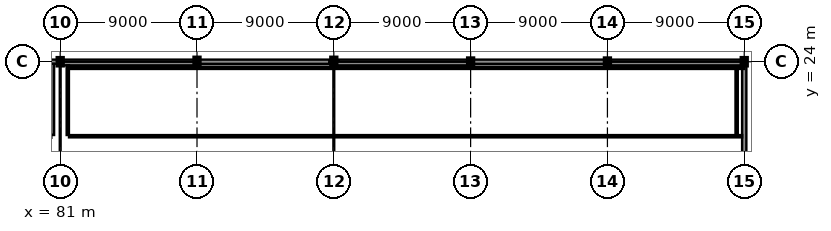
"""IFC4 building model, lengths in metres.
Left out: names, types, materials, properties, quantities, classifications, styles, units other than length and angle.
Written with IfcOpenShell. Run it as: python <this file> out.ifc"""

import sys

from ifc_helpers import new_model, si_unit, direction, frame, frame_2d, origin, origin_2d, place, context, subcontext, project, spatial, rectangle, i_section, extrude, element, fill, save


model = new_model("IFC4")
c1 = context("Model", 3, precision=1e-05, world=origin(), true_north=direction((0.0, 1.0)))
c2 = subcontext(c1, "Body", "Model", "MODEL_VIEW")
j1 = project(units=[si_unit("LENGTHUNIT", "METRE"), si_unit("PLANEANGLEUNIT", "RADIAN")], contexts=[c1])
p1 = place(None, origin())
s1 = spatial("IfcSite", under=j1, at=p1, CompositionType="ELEMENT")
p2 = place(p1, origin())
s2 = spatial("IfcBuilding", under=s1, at=p2, CompositionType="ELEMENT")
p3 = place(p2, frame((0.0, 0.0, 35.4)))
s3 = spatial("IfcBuildingStorey", under=s2, at=p3, CompositionType="ELEMENT", Elevation=35.4)
p4 = place(p3, frame((81.0, 24.0, 0.0), z_axis=(0.0, 0.0, 1.0), x_axis=(1.0, 0.0, 0.0)))
e1 = element("IfcColumn", 1, at=p4, inside=s3, PredefinedType="COLUMN", context=c2, shape_type="SweptSolid", body=[
    extrude(i_section(OverallWidth=0.3, OverallDepth=0.45, WebThickness=0.014, FlangeThickness=0.026, at=origin_2d()), origin(), (0.0, 0.0, 1.0), 3.8),
])
for number, where, z_axis, x_axis in (
    (2, (90.0, 24.0, 0.0), (0.0, 0.0, 1.0), (1.0, 0.0, 0.0)),
    (3, (99.0, 24.0, 0.0), (0.0, 0.0, 1.0), (0.0, 1.0, 0.0)),
):
    element("IfcColumn", number, at=place(p3, frame(where, z_axis=z_axis, x_axis=x_axis)), inside=s3, PredefinedType="COLUMN", context=c2, shape_type="SweptSolid", body=[
        extrude(i_section(OverallWidth=0.3, OverallDepth=0.5, WebThickness=0.014, FlangeThickness=0.028, at=origin_2d()), origin(), (0.0, 0.0, 1.0), 3.8),
    ])
for number, where, z_axis, x_axis in (
    (4, (108.0, 24.0, 0.0), (0.0, 0.0, 1.0), (1.0, 0.0, 0.0)),
    (5, (117.0, 24.0, 0.0), (0.0, 0.0, 1.0), (1.0, 0.0, 0.0)),
):
    element("IfcColumn", number, at=place(p3, frame(where, z_axis=z_axis, x_axis=x_axis)), inside=s3, PredefinedType="COLUMN", context=c2, shape_type="SweptSolid", body=[
        extrude(i_section(OverallWidth=0.3, OverallDepth=0.4, WebThickness=0.013, FlangeThickness=0.024, at=origin_2d()), origin(), (0.0, 0.0, 1.0), 3.8),
    ])
p5 = place(p3, frame((126.0, 24.0, 0.0), z_axis=(0.0, 0.0, 1.0), x_axis=(1.0, 0.0, 0.0)))
e6 = element("IfcColumn", 6, at=p5, inside=s3, PredefinedType="COLUMN", context=c2, shape_type="SweptSolid", body=[
    extrude(i_section(OverallWidth=0.3, OverallDepth=0.45, WebThickness=0.014, FlangeThickness=0.026, at=origin_2d()), origin(), (0.0, 0.0, 1.0), 3.8),
])
p6 = place(p3, frame((80.942, 24.0, 0.0), z_axis=(0.0, 0.0, 1.0), x_axis=(-1.0, 0.0, 0.0)))
e7 = element("IfcWall", 7, at=p6, inside=s3, PredefinedType="SOLIDWALL", context=c2, shape_type="SweptSolid", body=[
    extrude(rectangle(XDim=8.934, YDim=0.28, at=frame_2d((4.467, 0.0))), origin(), (0.0, 0.0, 1.0), 3.205),
])
p7 = place(p6, frame((2.03, 0.0, 1.05)))
e8 = element("IfcOpeningElement", 8, at=p7, cuts=e7, PredefinedType="OPENING", context=c2, shape_type="SweptSolid", body=[
    extrude(rectangle(XDim=1.3, YDim=1.3, at=frame_2d((0.65, 0.65))), frame((0.0, 0.155, 0.0), z_axis=(0.0, -1.0, 0.0), x_axis=(1.0, 0.0, 0.0)), (0.0, 0.0, 1.0), 0.31),
])
p8 = place(p6, frame((5.604, 0.0, 1.05)))
e9 = element("IfcOpeningElement", 9, at=p8, cuts=e7, PredefinedType="OPENING", context=c2, shape_type="SweptSolid", body=[
    extrude(rectangle(XDim=1.3, YDim=1.3, at=frame_2d((0.65, 0.65))), frame((0.0, 0.155, 0.0), z_axis=(0.0, -1.0, 0.0), x_axis=(1.0, 0.0, 0.0)), (0.0, 0.0, 1.0), 0.31),
])
p9 = place(p3, frame((98.702, 24.0, 0.0), z_axis=(0.0, 0.0, 1.0), x_axis=(-1.0, 0.0, 0.0)))
e10 = element("IfcWall", 10, at=p9, inside=s3, PredefinedType="SOLIDWALL", context=c2, shape_type="SweptSolid", body=[
    extrude(rectangle(XDim=8.694, YDim=0.28, at=frame_2d((4.347, 0.0))), origin(), (0.0, 0.0, 1.0), 3.205),
])
p10 = place(p9, frame((1.958, 0.0, 1.05)))
e11 = element("IfcOpeningElement", 11, at=p10, cuts=e10, PredefinedType="OPENING", context=c2, shape_type="SweptSolid", body=[
    extrude(rectangle(XDim=1.3, YDim=1.3, at=frame_2d((0.65, 0.65))), frame((0.0, 0.155, 0.0), z_axis=(0.0, -1.0, 0.0), x_axis=(1.0, 0.0, 0.0)), (0.0, 0.0, 1.0), 0.31),
])
p11 = place(p9, frame((5.436, 0.0, 1.05)))
e12 = element("IfcOpeningElement", 12, at=p11, cuts=e10, PredefinedType="OPENING", context=c2, shape_type="SweptSolid", body=[
    extrude(rectangle(XDim=1.3, YDim=1.3, at=frame_2d((0.65, 0.65))), frame((0.0, 0.155, 0.0), z_axis=(0.0, -1.0, 0.0), x_axis=(1.0, 0.0, 0.0)), (0.0, 0.0, 1.0), 0.31),
])
p12 = place(p3, frame((89.992, 24.0, 0.0), z_axis=(0.0, 0.0, 1.0), x_axis=(-1.0, 0.0, 0.0)))
e13 = element("IfcWall", 13, at=p12, inside=s3, PredefinedType="SOLIDWALL", context=c2, shape_type="SweptSolid", body=[
    extrude(rectangle(XDim=8.934, YDim=0.28, at=frame_2d((4.467, 0.0))), origin(), (0.0, 0.0, 1.0), 3.205),
])
p13 = place(p12, frame((2.03, 0.0, 1.05)))
e14 = element("IfcOpeningElement", 14, at=p13, cuts=e13, PredefinedType="OPENING", context=c2, shape_type="SweptSolid", body=[
    extrude(rectangle(XDim=1.3, YDim=1.3, at=frame_2d((0.65, 0.65))), frame((0.0, 0.155, 0.0), z_axis=(0.0, -1.0, 0.0), x_axis=(1.0, 0.0, 0.0)), (0.0, 0.0, 1.0), 0.31),
])
p14 = place(p12, frame((5.604, 0.0, 1.05)))
e15 = element("IfcOpeningElement", 15, at=p14, cuts=e13, PredefinedType="OPENING", context=c2, shape_type="SweptSolid", body=[
    extrude(rectangle(XDim=1.3, YDim=1.3, at=frame_2d((0.65, 0.65))), frame((0.0, 0.155, 0.0), z_axis=(0.0, -1.0, 0.0), x_axis=(1.0, 0.0, 0.0)), (0.0, 0.0, 1.0), 0.31),
])
p15 = place(p3, frame((126.0, 12.128, 0.0), z_axis=(0.0, 0.0, 1.0), x_axis=(0.0, 1.0, 0.0)))
e16 = element("IfcWall", 16, at=p15, inside=s3, PredefinedType="SOLIDWALL", context=c2, shape_type="SweptSolid", body=[
    extrude(rectangle(XDim=11.649, YDim=0.28, at=frame_2d((5.825, 0.0))), origin(), (0.0, 0.0, 1.0), 3.195),
])
p16 = place(p15, frame((2.032, 0.0, 1.05)))
e17 = element("IfcOpeningElement", 17, at=p16, cuts=e16, PredefinedType="OPENING", context=c2, shape_type="SweptSolid", body=[
    extrude(rectangle(XDim=1.3, YDim=1.3, at=frame_2d((0.65, 0.65))), frame((0.0, 0.155, 0.0), z_axis=(0.0, -1.0, 0.0), x_axis=(1.0, 0.0, 0.0)), (0.0, 0.0, 1.0), 0.31),
])
p17 = place(p15, frame((7.504, 0.0, 1.05)))
e18 = element("IfcOpeningElement", 18, at=p17, cuts=e16, PredefinedType="OPENING", context=c2, shape_type="SweptSolid", body=[
    extrude(rectangle(XDim=1.3, YDim=1.3, at=frame_2d((0.65, 0.65))), frame((0.0, 0.155, 0.0), z_axis=(0.0, -1.0, 0.0), x_axis=(1.0, 0.0, 0.0)), (0.0, 0.0, 1.0), 0.31),
])
p18 = place(p3, frame((125.992, 24.0, 0.0), z_axis=(0.0, 0.0, 1.0), x_axis=(-1.0, 0.0, 0.0)))
e19 = element("IfcWall", 19, at=p18, inside=s3, PredefinedType="SOLIDWALL", context=c2, shape_type="SweptSolid", body=[
    extrude(rectangle(XDim=8.984, YDim=0.28, at=frame_2d((4.492, 0.0))), origin(), (0.0, 0.0, 1.0), 3.205),
])
p19 = place(p18, frame((2.045, 0.0, 1.05)))
e20 = element("IfcOpeningElement", 20, at=p19, cuts=e19, PredefinedType="OPENING", context=c2, shape_type="SweptSolid", body=[
    extrude(rectangle(XDim=1.3, YDim=1.3, at=frame_2d((0.65, 0.65))), frame((0.0, 0.155, 0.0), z_axis=(0.0, -1.0, 0.0), x_axis=(1.0, 0.0, 0.0)), (0.0, 0.0, 1.0), 0.31),
])
p20 = place(p18, frame((5.639, 0.0, 1.05)))
e21 = element("IfcOpeningElement", 21, at=p20, cuts=e19, PredefinedType="OPENING", context=c2, shape_type="SweptSolid", body=[
    extrude(rectangle(XDim=1.3, YDim=1.3, at=frame_2d((0.65, 0.65))), frame((0.0, 0.155, 0.0), z_axis=(0.0, -1.0, 0.0), x_axis=(1.0, 0.0, 0.0)), (0.0, 0.0, 1.0), 0.31),
])
p21 = place(p3, frame((116.992, 24.0, 0.0), z_axis=(0.0, 0.0, 1.0), x_axis=(-1.0, 0.0, 0.0)))
e22 = element("IfcWall", 22, at=p21, inside=s3, PredefinedType="SOLIDWALL", context=c2, shape_type="SweptSolid", body=[
    extrude(rectangle(XDim=8.984, YDim=0.28, at=frame_2d((4.492, 0.0))), origin(), (0.0, 0.0, 1.0), 3.205),
])
p22 = place(p21, frame((2.045, 0.0, 1.05)))
e23 = element("IfcOpeningElement", 23, at=p22, cuts=e22, PredefinedType="OPENING", context=c2, shape_type="SweptSolid", body=[
    extrude(rectangle(XDim=1.3, YDim=1.3, at=frame_2d((0.65, 0.65))), frame((0.0, 0.155, 0.0), z_axis=(0.0, -1.0, 0.0), x_axis=(1.0, 0.0, 0.0)), (0.0, 0.0, 1.0), 0.31),
])
p23 = place(p21, frame((5.639, 0.0, 1.05)))
e24 = element("IfcOpeningElement", 24, at=p23, cuts=e22, PredefinedType="OPENING", context=c2, shape_type="SweptSolid", body=[
    extrude(rectangle(XDim=1.3, YDim=1.3, at=frame_2d((0.65, 0.65))), frame((0.0, 0.155, 0.0), z_axis=(0.0, -1.0, 0.0), x_axis=(1.0, 0.0, 0.0)), (0.0, 0.0, 1.0), 0.31),
])
p24 = place(p3, frame((107.992, 24.0, 0.0), z_axis=(0.0, 0.0, 1.0), x_axis=(-1.0, 0.0, 0.0)))
e25 = element("IfcWall", 25, at=p24, inside=s3, PredefinedType="SOLIDWALL", context=c2, shape_type="SweptSolid", body=[
    extrude(rectangle(XDim=8.694, YDim=0.28, at=frame_2d((4.347, 0.0))), origin(), (0.0, 0.0, 1.0), 3.205),
])
p25 = place(p24, frame((1.958, 0.0, 1.05)))
e26 = element("IfcOpeningElement", 26, at=p25, cuts=e25, PredefinedType="OPENING", context=c2, shape_type="SweptSolid", body=[
    extrude(rectangle(XDim=1.3, YDim=1.3, at=frame_2d((0.65, 0.65))), frame((0.0, 0.155, 0.0), z_axis=(0.0, -1.0, 0.0), x_axis=(1.0, 0.0, 0.0)), (0.0, 0.0, 1.0), 0.31),
])
p26 = place(p24, frame((5.436, 0.0, 1.05)))
e27 = element("IfcOpeningElement", 27, at=p26, cuts=e25, PredefinedType="OPENING", context=c2, shape_type="SweptSolid", body=[
    extrude(rectangle(XDim=1.3, YDim=1.3, at=frame_2d((0.65, 0.65))), frame((0.0, 0.155, 0.0), z_axis=(0.0, -1.0, 0.0), x_axis=(1.0, 0.0, 0.0)), (0.0, 0.0, 1.0), 0.31),
])
p27 = place(p3, frame((125.82, 23.88, 3.8), z_axis=(0.0, 0.0, 1.0), x_axis=(-1.0, 0.0, 0.0)))
e28 = element("IfcWall", 28, at=p27, inside=s3, PredefinedType="PARAPET", context=c2, shape_type="SweptSolid", body=[
    extrude(rectangle(XDim=8.76, YDim=0.24, at=frame_2d((4.38, 0.0))), origin(), (0.0, 0.0, 1.0), 1.1),
])
for number, where, z_axis, x_axis in (
    (29, (107.94, 23.88, 3.8), (0.0, 0.0, 1.0), (-1.0, 0.0, 0.0)),
    (30, (89.94, 23.88, 3.8), (0.0, 0.0, 1.0), (-1.0, 0.0, 0.0)),
):
    element("IfcWall", number, at=place(p3, frame(where, z_axis=z_axis, x_axis=x_axis)), inside=s3, PredefinedType="PARAPET", context=c2, shape_type="SweptSolid", body=[
        extrude(rectangle(XDim=8.88, YDim=0.24, at=frame_2d((4.44, 0.0))), origin(), (0.0, 0.0, 1.0), 1.1),
    ])
p28 = place(p3, frame((80.5, 23.865, 0.0), z_axis=(0.0, 0.0, 1.0), x_axis=(0.0, -1.0, 0.0)))
e31 = element("IfcWall", 31, at=p28, inside=s3, PredefinedType="PARTITIONING", context=c2, shape_type="SweptSolid", body=[
    extrude(rectangle(XDim=4.685, YDim=0.2, at=frame_2d((2.343, 0.0))), origin(), (0.0, 0.0, 1.0), 3.315),
])
p29 = place(p3, frame((81.58, 23.6, 0.0), z_axis=(0.0, 0.0, 1.0), x_axis=(1.0, 0.0, 0.0)))
e32 = element("IfcWall", 32, at=p29, inside=s3, PredefinedType="PARTITIONING", context=c2, shape_type="SweptSolid", body=[
    extrude(rectangle(XDim=44.412, YDim=0.15, at=frame_2d((22.206, 0.0))), origin(), (0.0, 0.0, 1.0), 3.64),
])
p30 = place(p3, frame((125.5, 23.53, 0.0), z_axis=(0.0, 0.0, 1.0), x_axis=(0.0, -1.0, 0.0)))
e33 = element("IfcWall", 33, at=p30, inside=s3, PredefinedType="PARTITIONING", context=c2, shape_type="SweptSolid", body=[
    extrude(rectangle(XDim=4.35, YDim=0.15, at=frame_2d((2.175, 0.0))), origin(), (0.0, 0.0, 1.0), 3.64),
])
p31 = place(p3, frame((125.865, 19.1, 0.0), z_axis=(0.0, 0.0, 1.0), x_axis=(-1.0, 0.0, 0.0)))
e34 = element("IfcWall", 34, at=p31, inside=s3, PredefinedType="PARTITIONING", context=c2, shape_type="SweptSolid", body=[
    extrude(rectangle(XDim=44.285, YDim=0.15, at=frame_2d((22.143, 0.0))), origin(), (0.0, 0.0, 1.0), 3.64),
])
p32 = place(p31, frame((21.617, 0.0, 0.0)))
e35 = element("IfcOpeningElement", 35, at=p32, cuts=e34, PredefinedType="OPENING", context=c2, shape_type="SweptSolid", body=[
    extrude(rectangle(XDim=1.05, YDim=2.25, at=frame_2d((0.525, 1.125))), frame((0.0, 0.09, 0.0), z_axis=(0.0, -1.0, 0.0), x_axis=(1.0, 0.0, 0.0)), (0.0, 0.0, 1.0), 0.18),
])
p33 = place(p3, frame((81.5, 19.18, 0.0), z_axis=(0.0, 0.0, 1.0), x_axis=(0.0, 1.0, 0.0)))
e36 = element("IfcWall", 36, at=p33, inside=s3, PredefinedType="PARTITIONING", context=c2, shape_type="SweptSolid", body=[
    extrude(rectangle(XDim=4.585, YDim=0.15, at=frame_2d((2.292, 0.0))), origin(), (0.0, 0.0, 1.0), 3.315),
])
p34 = place(p10, origin())
e37 = element("IfcWindow", 37, at=p34, inside=s3, PartitioningType="SINGLE_PANEL", PredefinedType="WINDOW", context=c2, shape_type="SweptSolid", body=[
    extrude(rectangle(XDim=1.3, YDim=1.3, at=frame_2d((0.65, 0.65))), frame((0.0, 0.03, 0.0), z_axis=(0.0, -1.0, 0.0), x_axis=(1.0, 0.0, 0.0)), (0.0, 0.0, 1.0), 0.06),
])
fill(e11, e37)
p35 = place(p11, origin())
e38 = element("IfcWindow", 38, at=p35, inside=s3, PartitioningType="SINGLE_PANEL", PredefinedType="WINDOW", context=c2, shape_type="SweptSolid", body=[
    extrude(rectangle(XDim=1.3, YDim=1.3, at=frame_2d((0.65, 0.65))), frame((0.0, 0.03, 0.0), z_axis=(0.0, -1.0, 0.0), x_axis=(1.0, 0.0, 0.0)), (0.0, 0.0, 1.0), 0.06),
])
fill(e12, e38)
p36 = place(p13, origin())
e39 = element("IfcWindow", 39, at=p36, inside=s3, PartitioningType="SINGLE_PANEL", PredefinedType="WINDOW", context=c2, shape_type="SweptSolid", body=[
    extrude(rectangle(XDim=1.3, YDim=1.3, at=frame_2d((0.65, 0.65))), frame((0.0, 0.03, 0.0), z_axis=(0.0, -1.0, 0.0), x_axis=(1.0, 0.0, 0.0)), (0.0, 0.0, 1.0), 0.06),
])
fill(e14, e39)
p37 = place(p14, origin())
e40 = element("IfcWindow", 40, at=p37, inside=s3, PartitioningType="SINGLE_PANEL", PredefinedType="WINDOW", context=c2, shape_type="SweptSolid", body=[
    extrude(rectangle(XDim=1.3, YDim=1.3, at=frame_2d((0.65, 0.65))), frame((0.0, 0.03, 0.0), z_axis=(0.0, -1.0, 0.0), x_axis=(1.0, 0.0, 0.0)), (0.0, 0.0, 1.0), 0.06),
])
fill(e15, e40)
p38 = place(p17, origin())
e41 = element("IfcWindow", 41, at=p38, inside=s3, PartitioningType="SINGLE_PANEL", PredefinedType="WINDOW", context=c2, shape_type="SweptSolid", body=[
    extrude(rectangle(XDim=1.3, YDim=1.3, at=frame_2d((0.65, 0.65))), frame((0.0, 0.03, 0.0), z_axis=(0.0, -1.0, 0.0), x_axis=(1.0, 0.0, 0.0)), (0.0, 0.0, 1.0), 0.06),
])
fill(e18, e41)
p39 = place(p19, origin())
e42 = element("IfcWindow", 42, at=p39, inside=s3, PartitioningType="SINGLE_PANEL", PredefinedType="WINDOW", context=c2, shape_type="SweptSolid", body=[
    extrude(rectangle(XDim=1.3, YDim=1.3, at=frame_2d((0.65, 0.65))), frame((0.0, 0.03, 0.0), z_axis=(0.0, -1.0, 0.0), x_axis=(1.0, 0.0, 0.0)), (0.0, 0.0, 1.0), 0.06),
])
fill(e20, e42)
p40 = place(p20, origin())
e43 = element("IfcWindow", 43, at=p40, inside=s3, PartitioningType="SINGLE_PANEL", PredefinedType="WINDOW", context=c2, shape_type="SweptSolid", body=[
    extrude(rectangle(XDim=1.3, YDim=1.3, at=frame_2d((0.65, 0.65))), frame((0.0, 0.03, 0.0), z_axis=(0.0, -1.0, 0.0), x_axis=(1.0, 0.0, 0.0)), (0.0, 0.0, 1.0), 0.06),
])
fill(e21, e43)
p41 = place(p22, origin())
e44 = element("IfcWindow", 44, at=p41, inside=s3, PartitioningType="SINGLE_PANEL", PredefinedType="WINDOW", context=c2, shape_type="SweptSolid", body=[
    extrude(rectangle(XDim=1.3, YDim=1.3, at=frame_2d((0.65, 0.65))), frame((0.0, 0.03, 0.0), z_axis=(0.0, -1.0, 0.0), x_axis=(1.0, 0.0, 0.0)), (0.0, 0.0, 1.0), 0.06),
])
fill(e23, e44)
p42 = place(p23, origin())
e45 = element("IfcWindow", 45, at=p42, inside=s3, PartitioningType="SINGLE_PANEL", PredefinedType="WINDOW", context=c2, shape_type="SweptSolid", body=[
    extrude(rectangle(XDim=1.3, YDim=1.3, at=frame_2d((0.65, 0.65))), frame((0.0, 0.03, 0.0), z_axis=(0.0, -1.0, 0.0), x_axis=(1.0, 0.0, 0.0)), (0.0, 0.0, 1.0), 0.06),
])
fill(e24, e45)
p43 = place(p25, origin())
e46 = element("IfcWindow", 46, at=p43, inside=s3, PartitioningType="SINGLE_PANEL", PredefinedType="WINDOW", context=c2, shape_type="SweptSolid", body=[
    extrude(rectangle(XDim=1.3, YDim=1.3, at=frame_2d((0.65, 0.65))), frame((0.0, 0.03, 0.0), z_axis=(0.0, -1.0, 0.0), x_axis=(1.0, 0.0, 0.0)), (0.0, 0.0, 1.0), 0.06),
])
fill(e26, e46)
p44 = place(p26, origin())
e47 = element("IfcWindow", 47, at=p44, inside=s3, PartitioningType="SINGLE_PANEL", PredefinedType="WINDOW", context=c2, shape_type="SweptSolid", body=[
    extrude(rectangle(XDim=1.3, YDim=1.3, at=frame_2d((0.65, 0.65))), frame((0.0, 0.03, 0.0), z_axis=(0.0, -1.0, 0.0), x_axis=(1.0, 0.0, 0.0)), (0.0, 0.0, 1.0), 0.06),
])
fill(e27, e47)
p45 = place(p32, frame((1.05, 0.0, 0.0), z_axis=(0.0, 0.0, 1.0), x_axis=(-1.0, 0.0, 0.0)))
e48 = element("IfcDoor", 48, at=p45, inside=s3, OperationType="SINGLE_SWING_LEFT", PredefinedType="DOOR", context=c2, shape_type="SweptSolid", body=[
    extrude(rectangle(XDim=1.05, YDim=2.25, at=frame_2d((0.525, 1.125))), frame((0.0, 0.025, 0.0), z_axis=(0.0, -1.0, 0.0), x_axis=(1.0, 0.0, 0.0)), (0.0, 0.0, 1.0), 0.05),
])
fill(e35, e48)
save(model, sys.argv[1])
